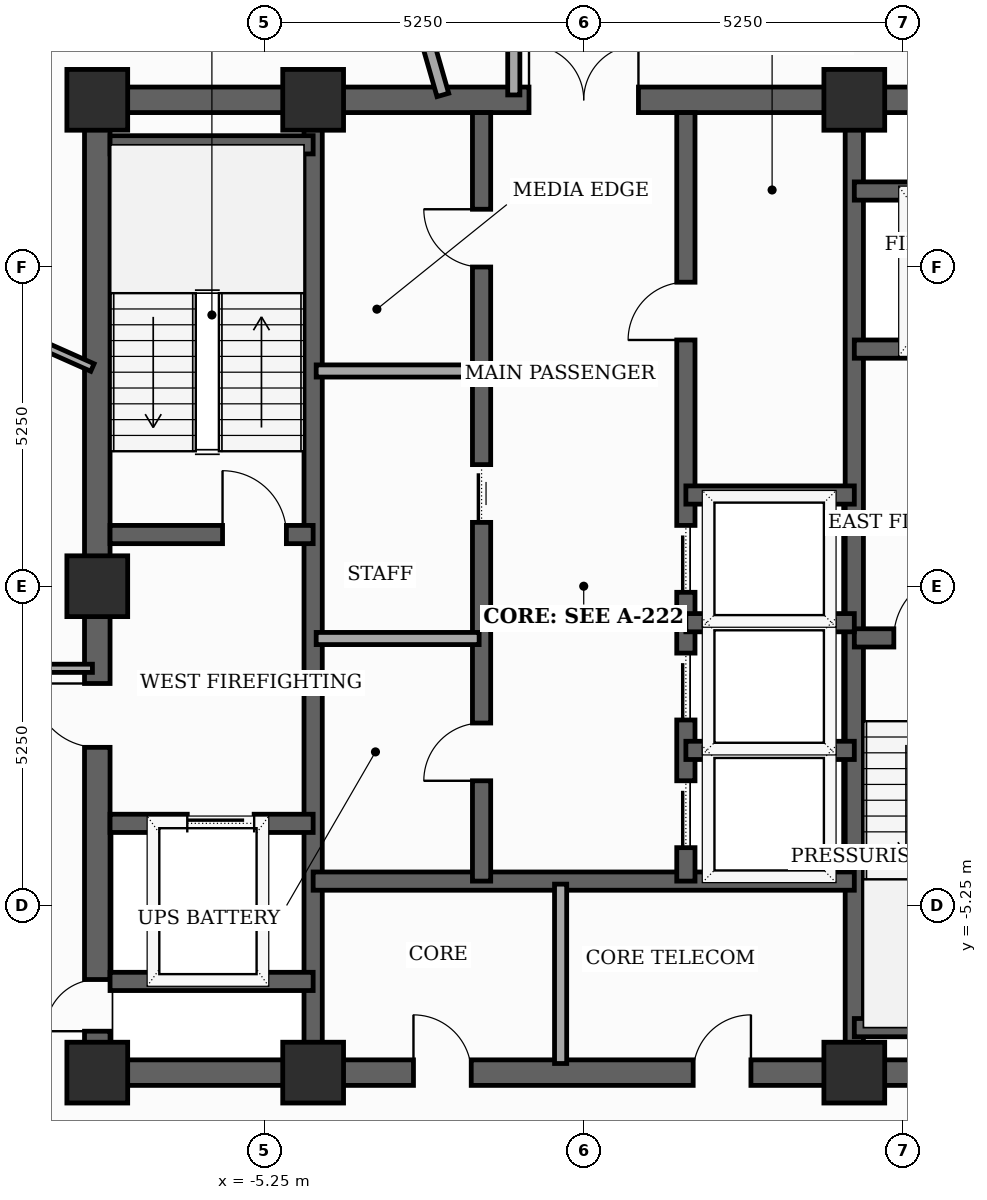
"""IFC4 building model, lengths in metres.
Left out: names, types, materials, properties, quantities, classifications, styles, units other than length and angle.
Written with IfcOpenShell. Run it as: python <this file> out.ifc"""

import sys

from ifc_helpers import new_model, si_unit, direction, frame, frame_2d, origin, origin_2d, place, context, subcontext, project, spatial, rectangle, extrude, element, fill, save


model = new_model("IFC4")
c1 = context("Model", 3, precision=1e-05, world=origin(), true_north=direction((0.0, 1.0)))
c2 = subcontext(c1, "Body", "Model", "MODEL_VIEW")
j1 = project(units=[si_unit("LENGTHUNIT", "METRE"), si_unit("PLANEANGLEUNIT", "RADIAN")], contexts=[c1])
p1 = place(None, origin())
s1 = spatial("IfcSite", under=j1, at=p1, CompositionType="ELEMENT")
p2 = place(p1, origin())
s2 = spatial("IfcBuilding", under=s1, at=p2, CompositionType="ELEMENT")
p3 = place(p2, frame((0.0, 0.0, 294.3)))
s3 = spatial("IfcBuildingStorey", under=s2, at=p3, CompositionType="ELEMENT", Elevation=294.3)
for number, where, z_axis, x_axis in (
    (1, (-8.0, -8.0, 0.0), (0.0, 0.0, 1.0), (1.0, 0.0, 0.0)),
    (2, (-4.45, -8.0, 0.0), (0.0, 0.0, 1.0), (1.0, 0.0, 0.0)),
    (3, (4.45, -8.0, 0.0), (0.0, 0.0, 1.0), (1.0, 0.0, 0.0)),
    (4, (4.45, 8.0, 0.0), (0.0, 0.0, 1.0), (1.0, 0.0, 0.0)),
    (5, (-4.45, 8.0, 0.0), (0.0, 0.0, 1.0), (1.0, 0.0, 0.0)),
    (6, (-8.0, 8.0, 0.0), (0.0, 0.0, 1.0), (1.0, 0.0, 0.0)),
    (7, (-8.0, 0.0, 0.0), (0.0, 0.0, 1.0), (1.0, 0.0, 0.0)),
):
    element("IfcColumn", number, at=place(p3, frame(where, z_axis=z_axis, x_axis=x_axis)), inside=s3, PredefinedType="COLUMN", context=c2, shape_type="SweptSolid", body=[
        extrude(rectangle(XDim=1.0, YDim=1.0, at=origin_2d()), origin(), (0.0, 0.0, 1.0), 3.7),
    ])
p4 = place(p3, frame((-8.0, -8.0, 0.0), z_axis=(0.0, 0.0, 1.0), x_axis=(0.0, 1.0, 0.0)))
e8 = element("IfcWall", 8, at=p4, inside=s3, PredefinedType="SHEAR", context=c2, shape_type="SweptSolid", body=[
    extrude(rectangle(XDim=16.0, YDim=0.42, at=frame_2d((8.0, 0.0))), origin(), (0.0, 0.0, 1.0), 3.5),
])
p5 = place(p4, frame((0.681, 0.0, 0.0)))
e9 = element("IfcOpeningElement", 9, at=p5, cuts=e8, PredefinedType="OPENING", context=c2, shape_type="SweptSolid", body=[
    extrude(rectangle(XDim=0.85, YDim=2.02, at=frame_2d((0.425, 1.01))), frame((0.0, 0.22, 0.0), z_axis=(0.0, -1.0, 0.0), x_axis=(1.0, 0.0, 0.0)), (0.0, 0.0, 1.0), 0.44),
])
p6 = place(p4, frame((5.35, 0.0, 0.0)))
e10 = element("IfcOpeningElement", 10, at=p6, cuts=e8, PredefinedType="OPENING", context=c2, shape_type="SweptSolid", body=[
    extrude(rectangle(XDim=1.05, YDim=2.15, at=frame_2d((0.525, 1.075))), frame((0.0, 0.22, 0.0), z_axis=(0.0, -1.0, 0.0), x_axis=(1.0, 0.0, 0.0)), (0.0, 0.0, 1.0), 0.44),
])
p7 = place(p3, frame((-8.0, -8.0, 0.0), z_axis=(0.0, 0.0, 1.0), x_axis=(1.0, 0.0, 0.0)))
e11 = element("IfcWall", 11, at=p7, inside=s3, PredefinedType="SHEAR", context=c2, shape_type="SweptSolid", body=[
    extrude(rectangle(XDim=16.0, YDim=0.42, at=frame_2d((8.0, 0.0))), origin(), (0.0, 0.0, 1.0), 3.5),
])
p8 = place(p7, frame((5.2, 0.0, 0.0)))
e12 = element("IfcOpeningElement", 12, at=p8, cuts=e11, PredefinedType="OPENING", context=c2, shape_type="SweptSolid", body=[
    extrude(rectangle(XDim=0.95, YDim=2.1, at=frame_2d((0.475, 1.05))), frame((0.0, 0.22, 0.0), z_axis=(0.0, -1.0, 0.0), x_axis=(1.0, 0.0, 0.0)), (0.0, 0.0, 1.0), 0.44),
])
p9 = place(p7, frame((9.8, 0.0, 0.0)))
e13 = element("IfcOpeningElement", 13, at=p9, cuts=e11, PredefinedType="OPENING", context=c2, shape_type="SweptSolid", body=[
    extrude(rectangle(XDim=0.95, YDim=2.1, at=frame_2d((0.475, 1.05))), frame((0.0, 0.22, 0.0), z_axis=(0.0, -1.0, 0.0), x_axis=(1.0, 0.0, 0.0)), (0.0, 0.0, 1.0), 0.44),
])
p10 = place(p3, frame((-8.0, 8.0, 0.0), z_axis=(0.0, 0.0, 1.0), x_axis=(1.0, 0.0, 0.0)))
e14 = element("IfcWall", 14, at=p10, inside=s3, PredefinedType="SHEAR", context=c2, shape_type="SweptSolid", body=[
    extrude(rectangle(XDim=16.0, YDim=0.42, at=frame_2d((8.0, 0.0))), origin(), (0.0, 0.0, 1.0), 3.5),
])
p11 = place(p10, frame((7.1, 0.0, 0.0)))
e15 = element("IfcOpeningElement", 15, at=p11, cuts=e14, PredefinedType="OPENING", context=c2, shape_type="SweptSolid", body=[
    extrude(rectangle(XDim=1.8, YDim=2.15, at=frame_2d((0.9, 1.075))), frame((0.0, 0.22, 0.0), z_axis=(0.0, -1.0, 0.0), x_axis=(1.0, 0.0, 0.0)), (0.0, 0.0, 1.0), 0.44),
])
for number, where, z_axis, x_axis in (
    (16, (-4.45, -7.79, 0.0), (0.0, 0.0, 1.0), (0.0, 1.0, 0.0)),
    (17, (4.45, -7.79, 0.0), (0.0, 0.0, 1.0), (0.0, 1.0, 0.0)),
):
    element("IfcWall", number, at=place(p3, frame(where, z_axis=z_axis, x_axis=x_axis)), inside=s3, PredefinedType="SHEAR", context=c2, shape_type="SweptSolid", body=[
        extrude(rectangle(XDim=15.58, YDim=0.3, at=frame_2d((7.79, 0.0))), origin(), (0.0, 0.0, 1.0), 3.5),
    ])
p12 = place(p3, frame((-7.79, 0.85, 0.0), z_axis=(0.0, 0.0, 1.0), x_axis=(1.0, 0.0, 0.0)))
e18 = element("IfcWall", 18, at=p12, inside=s3, PredefinedType="SHEAR", context=c2, shape_type="SweptSolid", body=[
    extrude(rectangle(XDim=3.34, YDim=0.3, at=frame_2d((1.67, 0.0))), origin(), (0.0, 0.0, 1.0), 3.5),
])
p13 = place(p12, frame((1.85, 0.0, 0.0)))
e19 = element("IfcOpeningElement", 19, at=p13, cuts=e18, PredefinedType="OPENING", context=c2, shape_type="SweptSolid", body=[
    extrude(rectangle(XDim=1.05, YDim=2.15, at=frame_2d((0.525, 1.075))), frame((0.0, 0.16, 0.0), z_axis=(0.0, -1.0, 0.0), x_axis=(1.0, 0.0, 0.0)), (0.0, 0.0, 1.0), 0.32),
])
p14 = place(p3, frame((-7.79, 7.26, 0.0), z_axis=(0.0, 0.0, 1.0), x_axis=(1.0, 0.0, 0.0)))
e20 = element("IfcWall", 20, at=p14, inside=s3, PredefinedType="SHEAR", context=c2, shape_type="SweptSolid", body=[
    extrude(rectangle(XDim=3.34, YDim=0.3, at=frame_2d((1.67, 0.0))), origin(), (0.0, 0.0, 1.0), 3.5),
])
p15 = place(p3, frame((4.45, -0.85, 0.0), z_axis=(0.0, 0.0, 1.0), x_axis=(1.0, 0.0, 0.0)))
e21 = element("IfcWall", 21, at=p15, inside=s3, PredefinedType="SHEAR", context=c2, shape_type="SweptSolid", body=[
    extrude(rectangle(XDim=3.34, YDim=0.3, at=frame_2d((1.67, 0.0))), origin(), (0.0, 0.0, 1.0), 3.5),
])
p16 = place(p15, frame((0.65, 0.0, 0.0)))
e22 = element("IfcOpeningElement", 22, at=p16, cuts=e21, PredefinedType="OPENING", context=c2, shape_type="SweptSolid", body=[
    extrude(rectangle(XDim=1.05, YDim=2.15, at=frame_2d((0.525, 1.075))), frame((0.0, 0.16, 0.0), z_axis=(0.0, -1.0, 0.0), x_axis=(1.0, 0.0, 0.0)), (0.0, 0.0, 1.0), 0.32),
])
p17 = place(p3, frame((4.45, -7.26, 0.0), z_axis=(0.0, 0.0, 1.0), x_axis=(1.0, 0.0, 0.0)))
e23 = element("IfcWall", 23, at=p17, inside=s3, PredefinedType="SHEAR", context=c2, shape_type="SweptSolid", body=[
    extrude(rectangle(XDim=3.55, YDim=0.3, at=frame_2d((1.775, 0.0))), origin(), (0.0, 0.0, 1.0), 3.5),
])
p18 = place(p3, frame((-7.79, -3.9, 0.0), z_axis=(0.0, 0.0, 1.0), x_axis=(1.0, 0.0, 0.0)))
e24 = element("IfcWall", 24, at=p18, inside=s3, PredefinedType="SHEAR", context=c2, shape_type="SweptSolid", body=[
    extrude(rectangle(XDim=3.34, YDim=0.3, at=frame_2d((1.67, 0.0))), origin(), (0.0, 0.0, 1.0), 3.5),
])
p19 = place(p18, frame((1.27, 0.0, 0.0)))
e25 = element("IfcOpeningElement", 25, at=p19, cuts=e24, PredefinedType="OPENING", context=c2, shape_type="SweptSolid", body=[
    extrude(rectangle(XDim=1.1, YDim=2.1, at=frame_2d((0.55, 1.05))), frame((0.0, 0.16, 0.0), z_axis=(0.0, -1.0, 0.0), x_axis=(1.0, 0.0, 0.0)), (0.0, 0.0, 1.0), 0.32),
])
p20 = place(p3, frame((-7.79, -6.5, 0.0), z_axis=(0.0, 0.0, 1.0), x_axis=(1.0, 0.0, 0.0)))
e26 = element("IfcWall", 26, at=p20, inside=s3, PredefinedType="SHEAR", context=c2, shape_type="SweptSolid", body=[
    extrude(rectangle(XDim=3.34, YDim=0.3, at=frame_2d((1.67, 0.0))), origin(), (0.0, 0.0, 1.0), 3.5),
])
p21 = place(p3, frame((4.45, 3.9, 0.0), z_axis=(0.0, 0.0, 1.0), x_axis=(1.0, 0.0, 0.0)))
e27 = element("IfcWall", 27, at=p21, inside=s3, PredefinedType="SHEAR", context=c2, shape_type="SweptSolid", body=[
    extrude(rectangle(XDim=3.34, YDim=0.3, at=frame_2d((1.67, 0.0))), origin(), (0.0, 0.0, 1.0), 3.5),
])
p22 = place(p21, frame((1.18, 0.0, 0.0)))
e28 = element("IfcOpeningElement", 28, at=p22, cuts=e27, PredefinedType="OPENING", context=c2, shape_type="SweptSolid", body=[
    extrude(rectangle(XDim=1.1, YDim=2.1, at=frame_2d((0.55, 1.05))), frame((0.0, 0.16, 0.0), z_axis=(0.0, -1.0, 0.0), x_axis=(1.0, 0.0, 0.0)), (0.0, 0.0, 1.0), 0.32),
])
p23 = place(p3, frame((4.45, 6.5, 0.0), z_axis=(0.0, 0.0, 1.0), x_axis=(1.0, 0.0, 0.0)))
e29 = element("IfcWall", 29, at=p23, inside=s3, PredefinedType="SHEAR", context=c2, shape_type="SweptSolid", body=[
    extrude(rectangle(XDim=3.34, YDim=0.3, at=frame_2d((1.67, 0.0))), origin(), (0.0, 0.0, 1.0), 3.5),
])
p24 = place(p3, frame((-4.45, -4.85, 0.0), z_axis=(0.0, 0.0, 1.0), x_axis=(1.0, 0.0, 0.0)))
e30 = element("IfcWall", 30, at=p24, inside=s3, PredefinedType="SHEAR", context=c2, shape_type="SweptSolid", body=[
    extrude(rectangle(XDim=8.9, YDim=0.3, at=frame_2d((4.45, 0.0))), origin(), (0.0, 0.0, 1.0), 3.5),
])
p25 = place(p3, frame((-1.68, -4.85, 0.0), z_axis=(0.0, 0.0, 1.0), x_axis=(0.0, 1.0, 0.0)))
e31 = element("IfcWall", 31, at=p25, inside=s3, PredefinedType="SHEAR", context=c2, shape_type="SweptSolid", body=[
    extrude(rectangle(XDim=12.64, YDim=0.3, at=frame_2d((6.32, 0.0))), origin(), (0.0, 0.0, 1.0), 3.5),
])
p26 = place(p25, frame((1.65, 0.0, 0.0)))
e32 = element("IfcOpeningElement", 32, at=p26, cuts=e31, PredefinedType="OPENING", context=c2, shape_type="SweptSolid", body=[
    extrude(rectangle(XDim=0.95, YDim=2.1, at=frame_2d((0.475, 1.05))), frame((0.0, 0.16, 0.0), z_axis=(0.0, -1.0, 0.0), x_axis=(1.0, 0.0, 0.0)), (0.0, 0.0, 1.0), 0.32),
])
p27 = place(p25, frame((5.9, 0.0, 0.0)))
e33 = element("IfcOpeningElement", 33, at=p27, cuts=e31, PredefinedType="OPENING", context=c2, shape_type="SweptSolid", body=[
    extrude(rectangle(XDim=0.95, YDim=2.1, at=frame_2d((0.475, 1.05))), frame((0.0, 0.16, 0.0), z_axis=(0.0, -1.0, 0.0), x_axis=(1.0, 0.0, 0.0)), (0.0, 0.0, 1.0), 0.32),
])
p28 = place(p25, frame((10.1, 0.0, 0.0)))
e34 = element("IfcOpeningElement", 34, at=p28, cuts=e31, PredefinedType="OPENING", context=c2, shape_type="SweptSolid", body=[
    extrude(rectangle(XDim=0.95, YDim=2.1, at=frame_2d((0.475, 1.05))), frame((0.0, 0.16, 0.0), z_axis=(0.0, -1.0, 0.0), x_axis=(1.0, 0.0, 0.0)), (0.0, 0.0, 1.0), 0.32),
])
p29 = place(p3, frame((1.68, -4.85, 0.0), z_axis=(0.0, 0.0, 1.0), x_axis=(0.0, 1.0, 0.0)))
e35 = element("IfcWall", 35, at=p29, inside=s3, PredefinedType="SHEAR", context=c2, shape_type="SweptSolid", body=[
    extrude(rectangle(XDim=12.64, YDim=0.3, at=frame_2d((6.32, 0.0))), origin(), (0.0, 0.0, 1.0), 3.5),
])
p30 = place(p29, frame((0.55, 0.0, 0.0)))
e36 = element("IfcOpeningElement", 36, at=p30, cuts=e35, PredefinedType="OPENING", context=c2, shape_type="SweptSolid", body=[
    extrude(rectangle(XDim=1.1, YDim=2.1, at=frame_2d((0.55, 1.05))), frame((0.0, 0.16, 0.0), z_axis=(0.0, -1.0, 0.0), x_axis=(1.0, 0.0, 0.0)), (0.0, 0.0, 1.0), 0.32),
])
p31 = place(p29, frame((2.65, 0.0, 0.0)))
e37 = element("IfcOpeningElement", 37, at=p31, cuts=e35, PredefinedType="OPENING", context=c2, shape_type="SweptSolid", body=[
    extrude(rectangle(XDim=1.1, YDim=2.1, at=frame_2d((0.55, 1.05))), frame((0.0, 0.16, 0.0), z_axis=(0.0, -1.0, 0.0), x_axis=(1.0, 0.0, 0.0)), (0.0, 0.0, 1.0), 0.32),
])
p32 = place(p29, frame((4.75, 0.0, 0.0)))
e38 = element("IfcOpeningElement", 38, at=p32, cuts=e35, PredefinedType="OPENING", context=c2, shape_type="SweptSolid", body=[
    extrude(rectangle(XDim=1.1, YDim=2.1, at=frame_2d((0.55, 1.05))), frame((0.0, 0.16, 0.0), z_axis=(0.0, -1.0, 0.0), x_axis=(1.0, 0.0, 0.0)), (0.0, 0.0, 1.0), 0.32),
])
p33 = place(p29, frame((8.9, 0.0, 0.0)))
e39 = element("IfcOpeningElement", 39, at=p33, cuts=e35, PredefinedType="OPENING", context=c2, shape_type="SweptSolid", body=[
    extrude(rectangle(XDim=0.95, YDim=2.1, at=frame_2d((0.475, 1.05))), frame((0.0, 0.16, 0.0), z_axis=(0.0, -1.0, 0.0), x_axis=(1.0, 0.0, 0.0)), (0.0, 0.0, 1.0), 0.32),
])
for number, where, z_axis, x_axis in (
    (40, (1.68, 1.5, 0.0), (0.0, 0.0, 1.0), (1.0, 0.0, 0.0)),
    (41, (1.68, -2.7, 0.0), (0.0, 0.0, 1.0), (1.0, 0.0, 0.0)),
    (42, (1.68, -0.6, 0.0), (0.0, 0.0, 1.0), (1.0, 0.0, 0.0)),
):
    element("IfcWall", number, at=place(p3, frame(where, z_axis=z_axis, x_axis=x_axis)), inside=s3, PredefinedType="SHEAR", context=c2, shape_type="SweptSolid", body=[
        extrude(rectangle(XDim=2.77, YDim=0.3, at=frame_2d((1.385, 0.0))), origin(), (0.0, 0.0, 1.0), 3.5),
    ])
p34 = place(p3, frame((-0.38, -7.85, 0.0), z_axis=(0.0, 0.0, 1.0), x_axis=(0.0, 1.0, 0.0)))
e43 = element("IfcWall", 43, at=p34, inside=s3, PredefinedType="SOLIDWALL", context=c2, shape_type="SweptSolid", body=[
    extrude(rectangle(XDim=2.95, YDim=0.2, at=frame_2d((1.475, 0.0))), origin(), (0.0, 0.0, 1.0), 2.885),
])
for number, where, z_axis, x_axis in (
    (44, (-4.4, -0.86, 0.0), (0.0, 0.0, 1.0), (1.0, 0.0, 0.0)),
    (45, (-4.4, 3.54, 0.0), (0.0, 0.0, 1.0), (1.0, 0.0, 0.0)),
):
    element("IfcWall", number, at=place(p3, frame(where, z_axis=z_axis, x_axis=x_axis)), inside=s3, PredefinedType="SOLIDWALL", context=c2, shape_type="SweptSolid", body=[
        extrude(rectangle(XDim=2.68, YDim=0.2, at=frame_2d((1.34, 0.0))), origin(), (0.0, 0.0, 1.0), 3.5),
    ])
p35 = place(p3, frame((-8.08, -1.35, 0.0), z_axis=(0.0, 0.0, 1.0), x_axis=(-1.0, 0.0, 0.0)))
e46 = element("IfcWall", 46, at=p35, inside=s3, PredefinedType="PARTITIONING", context=c2, shape_type="SweptSolid", body=[
    extrude(rectangle(XDim=2.57, YDim=0.135, at=frame_2d((1.285, 0.0))), origin(), (0.0, 0.0, 1.0), 2.885),
])
p36 = place(p3, frame((-1.15, 10.65, 0.0), z_axis=(0.0, 0.0, 1.0), x_axis=(0.0, -1.0, 0.0)))
e47 = element("IfcWall", 47, at=p36, inside=s3, PredefinedType="SOLIDWALL", context=c2, shape_type="SweptSolid", body=[
    extrude(rectangle(XDim=2.57, YDim=0.2, at=frame_2d((1.285, 0.0))), origin(), (0.0, 0.0, 1.0), 2.885),
])
p37 = place(p3, frame((-8.08, 3.597, 0.0), z_axis=(0.0, 0.0, 1.0), x_axis=(-0.913542590258, 0.406743083266, 0.0)))
e48 = element("IfcWall", 48, at=p37, inside=s3, PredefinedType="PARTITIONING", context=c2, shape_type="SweptSolid", body=[
    extrude(rectangle(XDim=18.505, YDim=0.135, at=frame_2d((9.252, 0.0))), origin(), (0.0, 0.0, 1.0), 2.885),
])
p38 = place(p37, frame((8.792, 0.0, 0.0)))
e49 = element("IfcOpeningElement", 49, at=p38, cuts=e48, PredefinedType="OPENING", context=c2, shape_type="SweptSolid", body=[
    extrude(rectangle(XDim=0.92, YDim=2.1, at=frame_2d((0.46, 1.05))), frame((0.0, 0.077, 0.0), z_axis=(0.0, -1.0, 0.0), x_axis=(1.0, 0.0, 0.0)), (0.0, 0.0, 1.0), 0.155),
])
p39 = place(p3, frame((-3.729, 13.005, 0.0), z_axis=(0.0, 0.0, 1.0), x_axis=(0.275658725111, -0.961255568135, 0.0)))
e50 = element("IfcWall", 50, at=p39, inside=s3, PredefinedType="SOLIDWALL", context=c2, shape_type="SweptSolid", body=[
    extrude(rectangle(XDim=5.124, YDim=0.2, at=frame_2d((2.562, 0.0))), origin(), (0.0, 0.0, 1.0), 2.885),
])
p40 = place(p5, origin())
e51 = element("IfcDoor", 51, at=p40, inside=s3, OperationType="SINGLE_SWING_LEFT", PredefinedType="TRAPDOOR", context=c2, shape_type="SweptSolid", body=[
    extrude(rectangle(XDim=0.85, YDim=2.02, at=frame_2d((0.425, 1.01))), frame((0.0, 0.025, 0.0), z_axis=(0.0, -1.0, 0.0), x_axis=(1.0, 0.0, 0.0)), (0.0, 0.0, 1.0), 0.05),
])
fill(e9, e51)
p41 = place(p6, origin())
e52 = element("IfcDoor", 52, at=p41, inside=s3, OperationType="SINGLE_SWING_RIGHT", PredefinedType="DOOR", context=c2, shape_type="SweptSolid", body=[
    extrude(rectangle(XDim=1.05, YDim=2.15, at=frame_2d((0.525, 1.075))), frame((0.0, 0.025, 0.0), z_axis=(0.0, -1.0, 0.0), x_axis=(1.0, 0.0, 0.0)), (0.0, 0.0, 1.0), 0.05),
])
fill(e10, e52)
p42 = place(p8, origin())
e53 = element("IfcDoor", 53, at=p42, inside=s3, OperationType="SINGLE_SWING_LEFT", PredefinedType="DOOR", context=c2, shape_type="SweptSolid", body=[
    extrude(rectangle(XDim=0.95, YDim=2.1, at=frame_2d((0.475, 1.05))), frame((0.0, 0.025, 0.0), z_axis=(0.0, -1.0, 0.0), x_axis=(1.0, 0.0, 0.0)), (0.0, 0.0, 1.0), 0.05),
])
fill(e12, e53)
p43 = place(p9, origin())
e54 = element("IfcDoor", 54, at=p43, inside=s3, OperationType="SINGLE_SWING_RIGHT", PredefinedType="DOOR", context=c2, shape_type="SweptSolid", body=[
    extrude(rectangle(XDim=0.95, YDim=2.1, at=frame_2d((0.475, 1.05))), frame((0.0, 0.025, 0.0), z_axis=(0.0, -1.0, 0.0), x_axis=(1.0, 0.0, 0.0)), (0.0, 0.0, 1.0), 0.05),
])
fill(e13, e54)
p44 = place(p11, origin())
e55 = element("IfcDoor", 55, at=p44, inside=s3, OperationType="DOUBLE_DOOR_SINGLE_SWING", PredefinedType="DOOR", context=c2, shape_type="SweptSolid", body=[
    extrude(rectangle(XDim=1.8, YDim=2.15, at=frame_2d((0.9, 1.075))), frame((0.0, 0.025, 0.0), z_axis=(0.0, -1.0, 0.0), x_axis=(1.0, 0.0, 0.0)), (0.0, 0.0, 1.0), 0.05),
])
fill(e15, e55)
p45 = place(p13, origin())
e56 = element("IfcDoor", 56, at=p45, inside=s3, OperationType="SINGLE_SWING_LEFT", PredefinedType="DOOR", context=c2, shape_type="SweptSolid", body=[
    extrude(rectangle(XDim=1.05, YDim=2.15, at=frame_2d((0.525, 1.075))), frame((0.0, 0.025, 0.0), z_axis=(0.0, -1.0, 0.0), x_axis=(1.0, 0.0, 0.0)), (0.0, 0.0, 1.0), 0.05),
])
fill(e19, e56)
p46 = place(p16, origin())
e57 = element("IfcDoor", 57, at=p46, inside=s3, OperationType="SINGLE_SWING_RIGHT", PredefinedType="DOOR", context=c2, shape_type="SweptSolid", body=[
    extrude(rectangle(XDim=1.05, YDim=2.15, at=frame_2d((0.525, 1.075))), frame((0.0, 0.025, 0.0), z_axis=(0.0, -1.0, 0.0), x_axis=(1.0, 0.0, 0.0)), (0.0, 0.0, 1.0), 0.05),
])
fill(e22, e57)
p47 = place(p19, origin())
e58 = element("IfcDoor", 58, at=p47, inside=s3, OperationType="SLIDING_TO_LEFT", PredefinedType="DOOR", context=c2, shape_type="SweptSolid", body=[
    extrude(rectangle(XDim=1.1, YDim=2.1, at=frame_2d((0.55, 1.05))), frame((0.0, 0.025, 0.0), z_axis=(0.0, -1.0, 0.0), x_axis=(1.0, 0.0, 0.0)), (0.0, 0.0, 1.0), 0.05),
])
fill(e25, e58)
p48 = place(p26, origin())
e59 = element("IfcDoor", 59, at=p48, inside=s3, OperationType="SINGLE_SWING_LEFT", PredefinedType="DOOR", context=c2, shape_type="SweptSolid", body=[
    extrude(rectangle(XDim=0.95, YDim=2.1, at=frame_2d((0.475, 1.05))), frame((0.0, 0.025, 0.0), z_axis=(0.0, -1.0, 0.0), x_axis=(1.0, 0.0, 0.0)), (0.0, 0.0, 1.0), 0.05),
])
fill(e32, e59)
p49 = place(p27, origin())
e60 = element("IfcDoor", 60, at=p49, inside=s3, OperationType="SLIDING_TO_LEFT", PredefinedType="DOOR", context=c2, shape_type="SweptSolid", body=[
    extrude(rectangle(XDim=0.95, YDim=2.1, at=frame_2d((0.475, 1.05))), frame((0.0, 0.025, 0.0), z_axis=(0.0, -1.0, 0.0), x_axis=(1.0, 0.0, 0.0)), (0.0, 0.0, 1.0), 0.05),
])
fill(e33, e60)
p50 = place(p28, origin())
e61 = element("IfcDoor", 61, at=p50, inside=s3, OperationType="SINGLE_SWING_RIGHT", PredefinedType="DOOR", context=c2, shape_type="SweptSolid", body=[
    extrude(rectangle(XDim=0.95, YDim=2.1, at=frame_2d((0.475, 1.05))), frame((0.0, 0.025, 0.0), z_axis=(0.0, -1.0, 0.0), x_axis=(1.0, 0.0, 0.0)), (0.0, 0.0, 1.0), 0.05),
])
fill(e34, e61)
p51 = place(p30, origin())
e62 = element("IfcDoor", 62, at=p51, inside=s3, OperationType="SLIDING_TO_LEFT", PredefinedType="DOOR", context=c2, shape_type="SweptSolid", body=[
    extrude(rectangle(XDim=1.1, YDim=2.1, at=frame_2d((0.55, 1.05))), frame((0.0, 0.025, 0.0), z_axis=(0.0, -1.0, 0.0), x_axis=(1.0, 0.0, 0.0)), (0.0, 0.0, 1.0), 0.05),
])
fill(e36, e62)
p52 = place(p31, origin())
e63 = element("IfcDoor", 63, at=p52, inside=s3, OperationType="SLIDING_TO_LEFT", PredefinedType="DOOR", context=c2, shape_type="SweptSolid", body=[
    extrude(rectangle(XDim=1.1, YDim=2.1, at=frame_2d((0.55, 1.05))), frame((0.0, 0.025, 0.0), z_axis=(0.0, -1.0, 0.0), x_axis=(1.0, 0.0, 0.0)), (0.0, 0.0, 1.0), 0.05),
])
fill(e37, e63)
p53 = place(p32, origin())
e64 = element("IfcDoor", 64, at=p53, inside=s3, OperationType="SLIDING_TO_LEFT", PredefinedType="DOOR", context=c2, shape_type="SweptSolid", body=[
    extrude(rectangle(XDim=1.1, YDim=2.1, at=frame_2d((0.55, 1.05))), frame((0.0, 0.025, 0.0), z_axis=(0.0, -1.0, 0.0), x_axis=(1.0, 0.0, 0.0)), (0.0, 0.0, 1.0), 0.05),
])
fill(e38, e64)
p54 = place(p33, origin())
e65 = element("IfcDoor", 65, at=p54, inside=s3, OperationType="SINGLE_SWING_LEFT", PredefinedType="DOOR", context=c2, shape_type="SweptSolid", body=[
    extrude(rectangle(XDim=0.95, YDim=2.1, at=frame_2d((0.475, 1.05))), frame((0.0, 0.025, 0.0), z_axis=(0.0, -1.0, 0.0), x_axis=(1.0, 0.0, 0.0)), (0.0, 0.0, 1.0), 0.05),
])
fill(e39, e65)
save(model, sys.argv[1])
